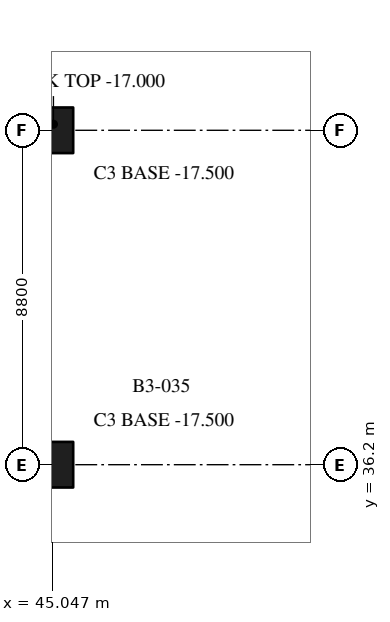
"""IFC4 building model, lengths in metres.
Left out: names, types, materials, properties, quantities, classifications, styles, units other than length and angle.
Written with IfcOpenShell. Run it as: python <this file> out.ifc"""

import sys

from ifc_helpers import new_model, si_unit, direction, frame, origin, origin_2d, place, context, subcontext, project, spatial, rectangle, extrude, element, save


model = new_model("IFC4")
c1 = context("Model", 3, precision=1e-05, world=origin(), true_north=direction((0.0, 1.0)))
c2 = subcontext(c1, "Body", "Model", "MODEL_VIEW")
j1 = project(units=[si_unit("LENGTHUNIT", "METRE"), si_unit("PLANEANGLEUNIT", "RADIAN")], contexts=[c1])
p1 = place(None, origin())
s1 = spatial("IfcSite", under=j1, at=p1, CompositionType="ELEMENT")
p2 = place(p1, origin())
s2 = spatial("IfcBuilding", under=s1, at=p2, CompositionType="ELEMENT")
p3 = place(p2, frame((0.0, 0.0, -17.0)))
s3 = spatial("IfcBuildingStorey", under=s2, at=p3, CompositionType="ELEMENT", Elevation=-17.0)
for number, where, z_axis, x_axis in (
    (1, (45.0, 36.2, -0.5), (0.0, 0.0, 1.0), (1.0, 0.0, 0.0)),
    (2, (45.0, 45.0, -0.5), (0.0, 0.0, 1.0), (1.0, 0.0, 0.0)),
):
    element("IfcColumn", number, at=place(p3, frame(where, z_axis=z_axis, x_axis=x_axis)), inside=s3, PredefinedType="COLUMN", context=c2, shape_type="SweptSolid", body=[
        extrude(rectangle(XDim=1.2, YDim=1.2, at=origin_2d()), origin(), (0.0, 0.0, 1.0), 5.5),
    ])
save(model, sys.argv[1])
